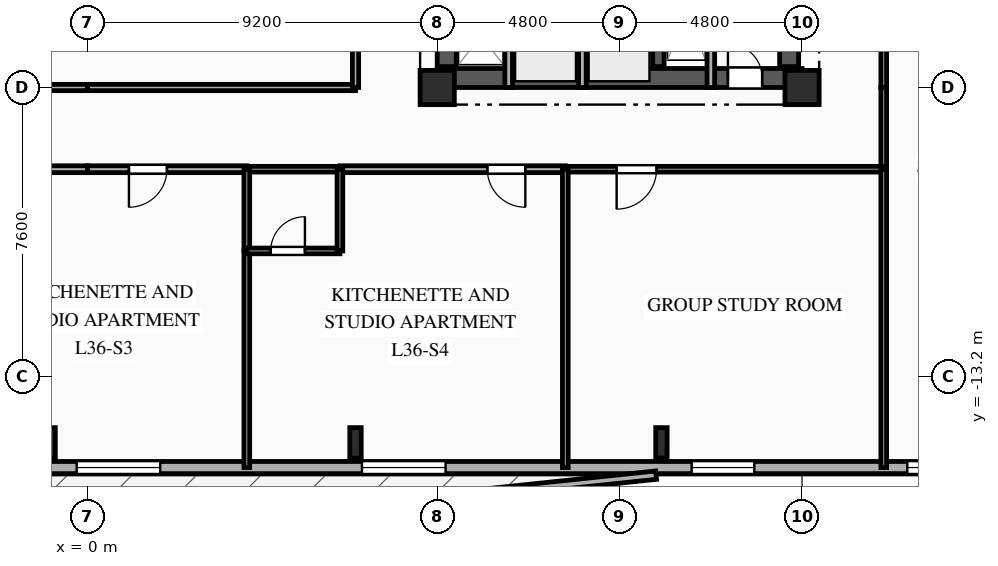
"""IFC4 building model, lengths in metres.
Left out: names, types, materials, properties, quantities, classifications, styles, units other than length and angle.
Written with IfcOpenShell. Run it as: python <this file> out.ifc"""

import sys

from ifc_helpers import new_model, si_unit, direction, frame, frame_2d, origin, origin_2d, place, context, subcontext, project, spatial, rectangle, i_section, extrude, element, fill, save


model = new_model("IFC4")
c1 = context("Model", 3, precision=1e-05, world=origin(), true_north=direction((0.0, 1.0)))
c2 = subcontext(c1, "Body", "Model", "MODEL_VIEW")
j1 = project(units=[si_unit("LENGTHUNIT", "METRE"), si_unit("PLANEANGLEUNIT", "RADIAN")], contexts=[c1])
p1 = place(None, origin())
s1 = spatial("IfcSite", under=j1, at=p1, CompositionType="ELEMENT")
p2 = place(p1, origin())
s2 = spatial("IfcBuilding", under=s1, at=p2, CompositionType="ELEMENT")
p3 = place(p2, frame((0.0, 0.0, 131.0)))
s3 = spatial("IfcBuildingStorey", under=s2, at=p3, CompositionType="ELEMENT", Elevation=131.0)
for number, where, z_axis, x_axis in (
    (1, (9.2, -5.6, 0.0), (0.0, 0.0, 1.0), (1.0, 0.0, 0.0)),
    (2, (18.8, -5.6, 0.0), (0.0, 0.0, 1.0), (1.0, 0.0, 0.0)),
):
    element("IfcColumn", number, at=place(p3, frame(where, z_axis=z_axis, x_axis=x_axis)), inside=s3, PredefinedType="COLUMN", context=c2, shape_type="SweptSolid", body=[
        extrude(rectangle(XDim=0.9, YDim=0.9, at=origin_2d()), origin(), (0.0, 0.0, 1.0), 3.35),
    ])
for number, where, z_axis, x_axis in (
    (3, (-1.0, -14.95, 0.0), (0.0, 0.0, 1.0), (1.0, 0.0, 0.0)),
    (4, (7.05, -14.95, 0.0), (0.0, 0.0, 1.0), (1.0, 0.0, 0.0)),
    (5, (15.1, -14.95, 0.0), (0.0, 0.0, 1.0), (1.0, 0.0, 0.0)),
):
    element("IfcColumn", number, at=place(p3, frame(where, z_axis=z_axis, x_axis=x_axis)), inside=s3, PredefinedType="COLUMN", context=c2, shape_type="SweptSolid", body=[
        extrude(i_section(OverallWidth=0.3, OverallDepth=0.8, WebThickness=0.018, FlangeThickness=0.033, FilletRadius=0.03, at=origin_2d()), origin(), (0.0, 0.0, 1.0), 3.35),
    ])
p4 = place(p3, frame((23.8, -15.6, 0.0), z_axis=(0.0, 0.0, 1.0), x_axis=(-1.0, 0.0, 0.0)))
e6 = element("IfcWall", 6, at=p4, inside=s3, PredefinedType="SOLIDWALL", context=c2, shape_type="SweptSolid", body=[
    extrude(rectangle(XDim=49.6, YDim=0.32, at=frame_2d((24.8, 0.0))), origin(), (0.0, 0.0, 1.0), 3.04),
])
p5 = place(p4, frame((1.13, 0.0, 0.85)))
e7 = element("IfcOpeningElement", 7, at=p5, cuts=e6, PredefinedType="OPENING", context=c2, shape_type="SweptSolid", body=[
    extrude(rectangle(XDim=1.1, YDim=1.85, at=frame_2d((0.55, 0.925))), frame((0.0, 0.17, 0.0), z_axis=(0.0, -1.0, 0.0), x_axis=(1.0, 0.0, 0.0)), (0.0, 0.0, 1.0), 0.34),
])
p6 = place(p4, frame((6.255, 0.0, 0.85)))
e8 = element("IfcOpeningElement", 8, at=p6, cuts=e6, PredefinedType="OPENING", context=c2, shape_type="SweptSolid", body=[
    extrude(rectangle(XDim=1.65, YDim=1.85, at=frame_2d((0.825, 0.925))), frame((0.0, 0.17, 0.0), z_axis=(0.0, -1.0, 0.0), x_axis=(1.0, 0.0, 0.0)), (0.0, 0.0, 1.0), 0.34),
])
p7 = place(p4, frame((14.38, 0.0, 0.85)))
e9 = element("IfcOpeningElement", 9, at=p7, cuts=e6, PredefinedType="OPENING", context=c2, shape_type="SweptSolid", body=[
    extrude(rectangle(XDim=2.2, YDim=1.85, at=frame_2d((1.1, 0.925))), frame((0.0, 0.17, 0.0), z_axis=(0.0, -1.0, 0.0), x_axis=(1.0, 0.0, 0.0)), (0.0, 0.0, 1.0), 0.34),
])
p8 = place(p4, frame((21.888, 0.0, 0.85)))
e10 = element("IfcOpeningElement", 10, at=p8, cuts=e6, PredefinedType="OPENING", context=c2, shape_type="SweptSolid", body=[
    extrude(rectangle(XDim=2.2, YDim=1.85, at=frame_2d((1.1, 0.925))), frame((0.0, 0.17, 0.0), z_axis=(0.0, -1.0, 0.0), x_axis=(1.0, 0.0, 0.0)), (0.0, 0.0, 1.0), 0.34),
])
p9 = place(p4, frame((30.236, 0.0, 0.85)))
e11 = element("IfcOpeningElement", 11, at=p9, cuts=e6, PredefinedType="OPENING", context=c2, shape_type="SweptSolid", body=[
    extrude(rectangle(XDim=2.2, YDim=1.85, at=frame_2d((1.1, 0.925))), frame((0.0, 0.17, 0.0), z_axis=(0.0, -1.0, 0.0), x_axis=(1.0, 0.0, 0.0)), (0.0, 0.0, 1.0), 0.34),
])
p10 = place(p4, frame((38.897, 0.0, 0.85)))
e12 = element("IfcOpeningElement", 12, at=p10, cuts=e6, PredefinedType="OPENING", context=c2, shape_type="SweptSolid", body=[
    extrude(rectangle(XDim=1.65, YDim=1.85, at=frame_2d((0.825, 0.925))), frame((0.0, 0.17, 0.0), z_axis=(0.0, -1.0, 0.0), x_axis=(1.0, 0.0, 0.0)), (0.0, 0.0, 1.0), 0.34),
])
p11 = place(p4, frame((46.175, 0.0, 0.85)))
e13 = element("IfcOpeningElement", 13, at=p11, cuts=e6, PredefinedType="OPENING", context=c2, shape_type="SweptSolid", body=[
    extrude(rectangle(XDim=1.65, YDim=1.85, at=frame_2d((0.825, 0.925))), frame((0.0, 0.17, 0.0), z_axis=(0.0, -1.0, 0.0), x_axis=(1.0, 0.0, 0.0)), (0.0, 0.0, 1.0), 0.34),
])
p12 = place(p3, frame((-23.376, -19.829, 0.0), z_axis=(0.0, 0.0, 1.0), x_axis=(0.994522202864, 0.104525537599, 0.0)))
e14 = element("IfcWall", 14, at=p12, inside=s3, PredefinedType="PARAPET", context=c2, shape_type="SweptSolid", body=[
    extrude(rectangle(XDim=38.546, YDim=0.22, at=frame_2d((19.273, 0.0))), origin(), (0.0, 0.0, 1.0), 0.65),
])
p13 = place(p3, frame((9.2, -5.35, 0.0), z_axis=(0.0, 0.0, 1.0), x_axis=(1.0, 0.0, 0.0)))
e15 = element("IfcWall", 15, at=p13, inside=s3, PredefinedType="SHEAR", context=c2, shape_type="SweptSolid", body=[
    extrude(rectangle(XDim=9.6, YDim=0.5, at=frame_2d((4.8, 0.0))), origin(), (0.0, 0.0, 1.0), 3.04),
])
p14 = place(p13, frame((7.65, 0.0, 0.0)))
e16 = element("IfcOpeningElement", 16, at=p14, cuts=e15, PredefinedType="OPENING", context=c2, shape_type="SweptSolid", body=[
    extrude(rectangle(XDim=0.9, YDim=2.1, at=frame_2d((0.45, 1.05))), frame((0.0, 0.26, 0.0), z_axis=(0.0, -1.0, 0.0), x_axis=(1.0, 0.0, 0.0)), (0.0, 0.0, 1.0), 0.52),
])
p15 = place(p3, frame((9.45, -5.05, 0.0), z_axis=(0.0, 0.0, 1.0), x_axis=(0.0, 1.0, 0.0)))
e17 = element("IfcWall", 17, at=p15, inside=s3, PredefinedType="SHEAR", context=c2, shape_type="SweptSolid", body=[
    extrude(rectangle(XDim=10.1, YDim=0.5, at=frame_2d((5.05, 0.0))), origin(), (0.0, 0.0, 1.0), 3.04),
])
p16 = place(p15, frame((7.15, 0.0, 0.0)))
e18 = element("IfcOpeningElement", 18, at=p16, cuts=e17, PredefinedType="OPENING", context=c2, shape_type="SweptSolid", body=[
    extrude(rectangle(XDim=0.9, YDim=2.1, at=frame_2d((0.45, 1.05))), frame((0.0, 0.26, 0.0), z_axis=(0.0, -1.0, 0.0), x_axis=(1.0, 0.0, 0.0)), (0.0, 0.0, 1.0), 0.52),
])
p17 = place(p15, frame((2.4, 0.0, 0.0)))
e19 = element("IfcOpeningElement", 19, at=p17, cuts=e17, PredefinedType="OPENING", context=c2, shape_type="SweptSolid", body=[
    extrude(rectangle(XDim=1.2, YDim=2.15, at=frame_2d((0.6, 1.075))), frame((0.0, 0.26, 0.0), z_axis=(0.0, -1.0, 0.0), x_axis=(1.0, 0.0, 0.0)), (0.0, 0.0, 1.0), 0.52),
])
p18 = place(p3, frame((18.46, -5.05, 0.0), z_axis=(0.0, 0.0, 1.0), x_axis=(0.0, 1.0, 0.0)))
e20 = element("IfcWall", 20, at=p18, inside=s3, PredefinedType="SHEAR", context=c2, shape_type="SweptSolid", body=[
    extrude(rectangle(XDim=10.1, YDim=0.5, at=frame_2d((5.05, 0.0))), origin(), (0.0, 0.0, 1.0), 3.04),
])
p19 = place(p3, frame((15.02, -5.05, 0.0), z_axis=(0.0, 0.0, 1.0), x_axis=(0.0, 1.0, 0.0)))
e21 = element("IfcWall", 21, at=p19, inside=s3, PredefinedType="SHEAR", context=c2, shape_type="SweptSolid", body=[
    extrude(rectangle(XDim=10.1, YDim=0.3, at=frame_2d((5.05, 0.0))), origin(), (0.0, 0.0, 1.0), 3.04),
])
p20 = place(p3, frame((16.4, -2.11, 0.0), z_axis=(0.0, 0.0, 1.0), x_axis=(0.0, -1.0, 0.0)))
e22 = element("IfcWall", 22, at=p20, inside=s3, PredefinedType="PARTITIONING", context=c2, shape_type="SweptSolid", body=[
    extrude(rectangle(XDim=3.49, YDim=0.2, at=frame_2d((1.745, 0.0))), origin(), (0.0, 0.0, 1.0), 3.04),
])
for number, where, z_axis, x_axis in (
    (23, (11.08, -5.6, 0.0), (0.0, 0.0, 1.0), (0.0, 1.0, 0.0)),
    (24, (13.02, -5.6, 0.0), (0.0, 0.0, 1.0), (0.0, 1.0, 0.0)),
):
    element("IfcWall", number, at=place(p3, frame(where, z_axis=z_axis, x_axis=x_axis)), inside=s3, PredefinedType="PARTITIONING", context=c2, shape_type="SweptSolid", body=[
        extrude(rectangle(XDim=2.25, YDim=0.2, at=frame_2d((1.125, 0.0))), origin(), (0.0, 0.0, 1.0), 3.04),
    ])
p21 = place(p3, frame((0.0, -7.75, 0.0), z_axis=(0.0, 0.0, 1.0), x_axis=(-1.0, 0.0, 0.0)))
e25 = element("IfcWall", 25, at=p21, inside=s3, PredefinedType="PARTITIONING", context=c2, shape_type="SweptSolid", body=[
    extrude(rectangle(XDim=1.74, YDim=0.18, at=frame_2d((0.87, 0.0))), origin(), (0.0, 0.0, 1.0), 3.04),
])
p22 = place(p3, frame((-7.05, -5.6, 0.0), z_axis=(0.0, 0.0, 1.0), x_axis=(1.0, 0.0, 0.0)))
e26 = element("IfcWall", 26, at=p22, inside=s3, PredefinedType="PARTITIONING", context=c2, shape_type="SweptSolid", body=[
    extrude(rectangle(XDim=7.05, YDim=0.165, at=frame_2d((3.525, 0.0))), origin(), (0.0, 0.0, 1.0), 2.525),
])
p23 = place(p3, frame((20.95, -5.6, 0.0), z_axis=(0.0, 0.0, 1.0), x_axis=(0.0, -1.0, 0.0)))
e27 = element("IfcWall", 27, at=p23, inside=s3, PredefinedType="PARTITIONING", context=c2, shape_type="SweptSolid", body=[
    extrude(rectangle(XDim=2.15, YDim=0.15, at=frame_2d((1.075, 0.0))), origin(), (0.0, 0.0, 1.0), 3.04),
])
p24 = place(p3, frame((4.19, -7.75, 0.0), z_axis=(0.0, 0.0, 1.0), x_axis=(-1.0, 0.0, 0.0)))
e28 = element("IfcWall", 28, at=p24, inside=s3, PredefinedType="PARTITIONING", context=c2, shape_type="SweptSolid", body=[
    extrude(rectangle(XDim=4.19, YDim=0.18, at=frame_2d((2.095, 0.0))), origin(), (0.0, 0.0, 1.0), 3.04),
])
p25 = place(p24, frame((2.103, 0.0, 0.0)))
e29 = element("IfcOpeningElement", 29, at=p25, cuts=e28, PredefinedType="OPENING", context=c2, shape_type="SweptSolid", body=[
    extrude(rectangle(XDim=1.0, YDim=2.15, at=frame_2d((0.5, 1.075))), frame((0.0, 0.1, 0.0), z_axis=(0.0, -1.0, 0.0), x_axis=(1.0, 0.0, 0.0)), (0.0, 0.0, 1.0), 0.2),
])
p26 = place(p3, frame((12.57, -7.75, 0.0), z_axis=(0.0, 0.0, 1.0), x_axis=(-1.0, 0.0, 0.0)))
e30 = element("IfcWall", 30, at=p26, inside=s3, PredefinedType="PARTITIONING", context=c2, shape_type="SweptSolid", body=[
    extrude(rectangle(XDim=5.93, YDim=0.18, at=frame_2d((2.965, 0.0))), origin(), (0.0, 0.0, 1.0), 3.04),
])
p27 = place(p26, frame((1.051, 0.0, 0.0)))
e31 = element("IfcOpeningElement", 31, at=p27, cuts=e30, PredefinedType="OPENING", context=c2, shape_type="SweptSolid", body=[
    extrude(rectangle(XDim=1.0, YDim=2.15, at=frame_2d((0.5, 1.075))), frame((0.0, 0.1, 0.0), z_axis=(0.0, -1.0, 0.0), x_axis=(1.0, 0.0, 0.0)), (0.0, 0.0, 1.0), 0.2),
])
p28 = place(p3, frame((6.64, -7.75, 0.0), z_axis=(0.0, 0.0, 1.0), x_axis=(-1.0, 0.0, 0.0)))
e32 = element("IfcWall", 32, at=p28, inside=s3, PredefinedType="PLUMBINGWALL", context=c2, shape_type="SweptSolid", body=[
    extrude(rectangle(XDim=2.45, YDim=0.15, at=frame_2d((1.225, 0.0))), origin(), (0.0, 0.0, 1.0), 3.04),
])
p29 = place(p3, frame((20.95, -7.75, 0.0), z_axis=(0.0, 0.0, 1.0), x_axis=(-1.0, 0.0, 0.0)))
e33 = element("IfcWall", 33, at=p29, inside=s3, PredefinedType="PARTITIONING", context=c2, shape_type="SweptSolid", body=[
    extrude(rectangle(XDim=8.38, YDim=0.15, at=frame_2d((4.19, 0.0))), origin(), (0.0, 0.0, 1.0), 3.04),
])
p30 = place(p29, frame((5.979, 0.0, 0.0)))
e34 = element("IfcOpeningElement", 34, at=p30, cuts=e33, PredefinedType="OPENING", context=c2, shape_type="SweptSolid", body=[
    extrude(rectangle(XDim=1.05, YDim=2.15, at=frame_2d((0.525, 1.075))), frame((0.0, 0.085, 0.0), z_axis=(0.0, -1.0, 0.0), x_axis=(1.0, 0.0, 0.0)), (0.0, 0.0, 1.0), 0.17),
])
p31 = place(p3, frame((0.0, -5.6, 0.0), z_axis=(0.0, 0.0, 1.0), x_axis=(1.0, 0.0, 0.0)))
e35 = element("IfcWall", 35, at=p31, inside=s3, PredefinedType="PARTITIONING", context=c2, shape_type="SweptSolid", body=[
    extrude(rectangle(XDim=7.05, YDim=0.165, at=frame_2d((3.525, 0.0))), origin(), (0.0, 0.0, 1.0), 2.525),
])
p32 = place(p3, frame((20.95, 2.4, 0.0), z_axis=(0.0, 0.0, 1.0), x_axis=(0.0, -1.0, 0.0)))
e36 = element("IfcWall", 36, at=p32, inside=s3, PredefinedType="PARTITIONING", context=c2, shape_type="SweptSolid", body=[
    extrude(rectangle(XDim=8.0, YDim=0.15, at=frame_2d((4.0, 0.0))), origin(), (0.0, 0.0, 1.0), 3.04),
])
p33 = place(p32, frame((2.028, 0.0, 0.0)))
e37 = element("IfcOpeningElement", 37, at=p33, cuts=e36, PredefinedType="OPENING", context=c2, shape_type="SweptSolid", body=[
    extrude(rectangle(XDim=1.05, YDim=2.15, at=frame_2d((0.525, 1.075))), frame((0.0, 0.085, 0.0), z_axis=(0.0, -1.0, 0.0), x_axis=(1.0, 0.0, 0.0)), (0.0, 0.0, 1.0), 0.17),
])
p34 = place(p3, frame((7.05, -5.6, 0.0), z_axis=(0.0, 0.0, 1.0), x_axis=(0.0, 1.0, 0.0)))
e38 = element("IfcWall", 38, at=p34, inside=s3, PredefinedType="PARTITIONING", context=c2, shape_type="SweptSolid", body=[
    extrude(rectangle(XDim=2.65, YDim=0.165, at=frame_2d((1.325, 0.0))), origin(), (0.0, 0.0, 1.0), 3.04),
])
p35 = place(p3, frame((20.95, -15.6, 0.0), z_axis=(0.0, 0.0, 1.0), x_axis=(0.0, 1.0, 0.0)))
e39 = element("IfcWall", 39, at=p35, inside=s3, PredefinedType="PARTITIONING", context=c2, shape_type="SweptSolid", body=[
    extrude(rectangle(XDim=7.85, YDim=0.15, at=frame_2d((3.925, 0.0))), origin(), (0.0, 0.0, 1.0), 3.04),
])
p36 = place(p3, frame((4.19, -9.9, 0.0), z_axis=(0.0, 0.0, 1.0), x_axis=(0.0, -1.0, 0.0)))
e40 = element("IfcWall", 40, at=p36, inside=s3, PredefinedType="PARTITIONING", context=c2, shape_type="SweptSolid", body=[
    extrude(rectangle(XDim=5.7, YDim=0.15, at=frame_2d((2.85, 0.0))), origin(), (0.0, 0.0, 1.0), 3.04),
])
p37 = place(p3, frame((4.19, -7.75, 0.0), z_axis=(0.0, 0.0, 1.0), x_axis=(0.0, -1.0, 0.0)))
e41 = element("IfcWall", 41, at=p37, inside=s3, PredefinedType="PLUMBINGWALL", context=c2, shape_type="SweptSolid", body=[
    extrude(rectangle(XDim=2.15, YDim=0.15, at=frame_2d((1.075, 0.0))), origin(), (0.0, 0.0, 1.0), 3.04),
])
p38 = place(p3, frame((4.19, -9.9, 0.0), z_axis=(0.0, 0.0, 1.0), x_axis=(1.0, 0.0, 0.0)))
e42 = element("IfcWall", 42, at=p38, inside=s3, PredefinedType="PLUMBINGWALL", context=c2, shape_type="SweptSolid", body=[
    extrude(rectangle(XDim=2.45, YDim=0.15, at=frame_2d((1.225, 0.0))), origin(), (0.0, 0.0, 1.0), 3.04),
])
p39 = place(p38, frame((0.629, 0.0, 0.0)))
e43 = element("IfcOpeningElement", 43, at=p39, cuts=e42, PredefinedType="OPENING", context=c2, shape_type="SweptSolid", body=[
    extrude(rectangle(XDim=0.9, YDim=2.1, at=frame_2d((0.45, 1.05))), frame((0.0, 0.085, 0.0), z_axis=(0.0, -1.0, 0.0), x_axis=(1.0, 0.0, 0.0)), (0.0, 0.0, 1.0), 0.17),
])
p40 = place(p3, frame((6.64, -9.9, 0.0), z_axis=(0.0, 0.0, 1.0), x_axis=(0.0, 1.0, 0.0)))
e44 = element("IfcWall", 44, at=p40, inside=s3, PredefinedType="PLUMBINGWALL", context=c2, shape_type="SweptSolid", body=[
    extrude(rectangle(XDim=2.15, YDim=0.15, at=frame_2d((1.075, 0.0))), origin(), (0.0, 0.0, 1.0), 3.04),
])
p41 = place(p3, frame((12.57, -7.75, 0.0), z_axis=(0.0, 0.0, 1.0), x_axis=(0.0, -1.0, 0.0)))
e45 = element("IfcWall", 45, at=p41, inside=s3, PredefinedType="PARTITIONING", context=c2, shape_type="SweptSolid", body=[
    extrude(rectangle(XDim=7.85, YDim=0.15, at=frame_2d((3.925, 0.0))), origin(), (0.0, 0.0, 1.0), 3.04),
])
p42 = place(p5, origin())
e46 = element("IfcWindow", 46, at=p42, inside=s3, PartitioningType="SINGLE_PANEL", PredefinedType="WINDOW", context=c2, shape_type="SweptSolid", body=[
    extrude(rectangle(XDim=1.1, YDim=1.85, at=frame_2d((0.55, 0.925))), frame((0.0, 0.03, 0.0), z_axis=(0.0, -1.0, 0.0), x_axis=(1.0, 0.0, 0.0)), (0.0, 0.0, 1.0), 0.06),
])
fill(e7, e46)
p43 = place(p6, origin())
e47 = element("IfcWindow", 47, at=p43, inside=s3, PartitioningType="SINGLE_PANEL", PredefinedType="WINDOW", context=c2, shape_type="SweptSolid", body=[
    extrude(rectangle(XDim=1.65, YDim=1.85, at=frame_2d((0.825, 0.925))), frame((0.0, 0.03, 0.0), z_axis=(0.0, -1.0, 0.0), x_axis=(1.0, 0.0, 0.0)), (0.0, 0.0, 1.0), 0.06),
])
fill(e8, e47)
p44 = place(p7, origin())
e48 = element("IfcWindow", 48, at=p44, inside=s3, PartitioningType="SINGLE_PANEL", PredefinedType="WINDOW", context=c2, shape_type="SweptSolid", body=[
    extrude(rectangle(XDim=2.2, YDim=1.85, at=frame_2d((1.1, 0.925))), frame((0.0, 0.03, 0.0), z_axis=(0.0, -1.0, 0.0), x_axis=(1.0, 0.0, 0.0)), (0.0, 0.0, 1.0), 0.06),
])
fill(e9, e48)
p45 = place(p8, origin())
e49 = element("IfcWindow", 49, at=p45, inside=s3, PartitioningType="SINGLE_PANEL", PredefinedType="WINDOW", context=c2, shape_type="SweptSolid", body=[
    extrude(rectangle(XDim=2.2, YDim=1.85, at=frame_2d((1.1, 0.925))), frame((0.0, 0.03, 0.0), z_axis=(0.0, -1.0, 0.0), x_axis=(1.0, 0.0, 0.0)), (0.0, 0.0, 1.0), 0.06),
])
fill(e10, e49)
p46 = place(p14, origin())
e50 = element("IfcDoor", 50, at=p46, inside=s3, OperationType="SINGLE_SWING_LEFT", PredefinedType="DOOR", context=c2, shape_type="SweptSolid", body=[
    extrude(rectangle(XDim=0.9, YDim=2.1, at=frame_2d((0.45, 1.05))), frame((0.0, 0.025, 0.0), z_axis=(0.0, -1.0, 0.0), x_axis=(1.0, 0.0, 0.0)), (0.0, 0.0, 1.0), 0.05),
])
fill(e16, e50)
p47 = place(p25, origin())
e51 = element("IfcDoor", 51, at=p47, inside=s3, OperationType="SINGLE_SWING_RIGHT", PredefinedType="DOOR", context=c2, shape_type="SweptSolid", body=[
    extrude(rectangle(XDim=1.0, YDim=2.15, at=frame_2d((0.5, 1.075))), frame((0.0, 0.025, 0.0), z_axis=(0.0, -1.0, 0.0), x_axis=(1.0, 0.0, 0.0)), (0.0, 0.0, 1.0), 0.05),
])
fill(e29, e51)
p48 = place(p27, origin())
e52 = element("IfcDoor", 52, at=p48, inside=s3, OperationType="SINGLE_SWING_LEFT", PredefinedType="DOOR", context=c2, shape_type="SweptSolid", body=[
    extrude(rectangle(XDim=1.0, YDim=2.15, at=frame_2d((0.5, 1.075))), frame((0.0, 0.025, 0.0), z_axis=(0.0, -1.0, 0.0), x_axis=(1.0, 0.0, 0.0)), (0.0, 0.0, 1.0), 0.05),
])
fill(e31, e52)
p49 = place(p30, origin())
e53 = element("IfcDoor", 53, at=p49, inside=s3, OperationType="SINGLE_SWING_RIGHT", PredefinedType="DOOR", context=c2, shape_type="SweptSolid", body=[
    extrude(rectangle(XDim=1.05, YDim=2.15, at=frame_2d((0.525, 1.075))), frame((0.0, 0.025, 0.0), z_axis=(0.0, -1.0, 0.0), x_axis=(1.0, 0.0, 0.0)), (0.0, 0.0, 1.0), 0.05),
])
fill(e34, e53)
p50 = place(p39, origin())
e54 = element("IfcDoor", 54, at=p50, inside=s3, OperationType="SINGLE_SWING_RIGHT", PredefinedType="DOOR", context=c2, shape_type="SweptSolid", body=[
    extrude(rectangle(XDim=0.9, YDim=2.1, at=frame_2d((0.45, 1.05))), frame((0.0, 0.025, 0.0), z_axis=(0.0, -1.0, 0.0), x_axis=(1.0, 0.0, 0.0)), (0.0, 0.0, 1.0), 0.05),
])
fill(e43, e54)
save(model, sys.argv[1])
